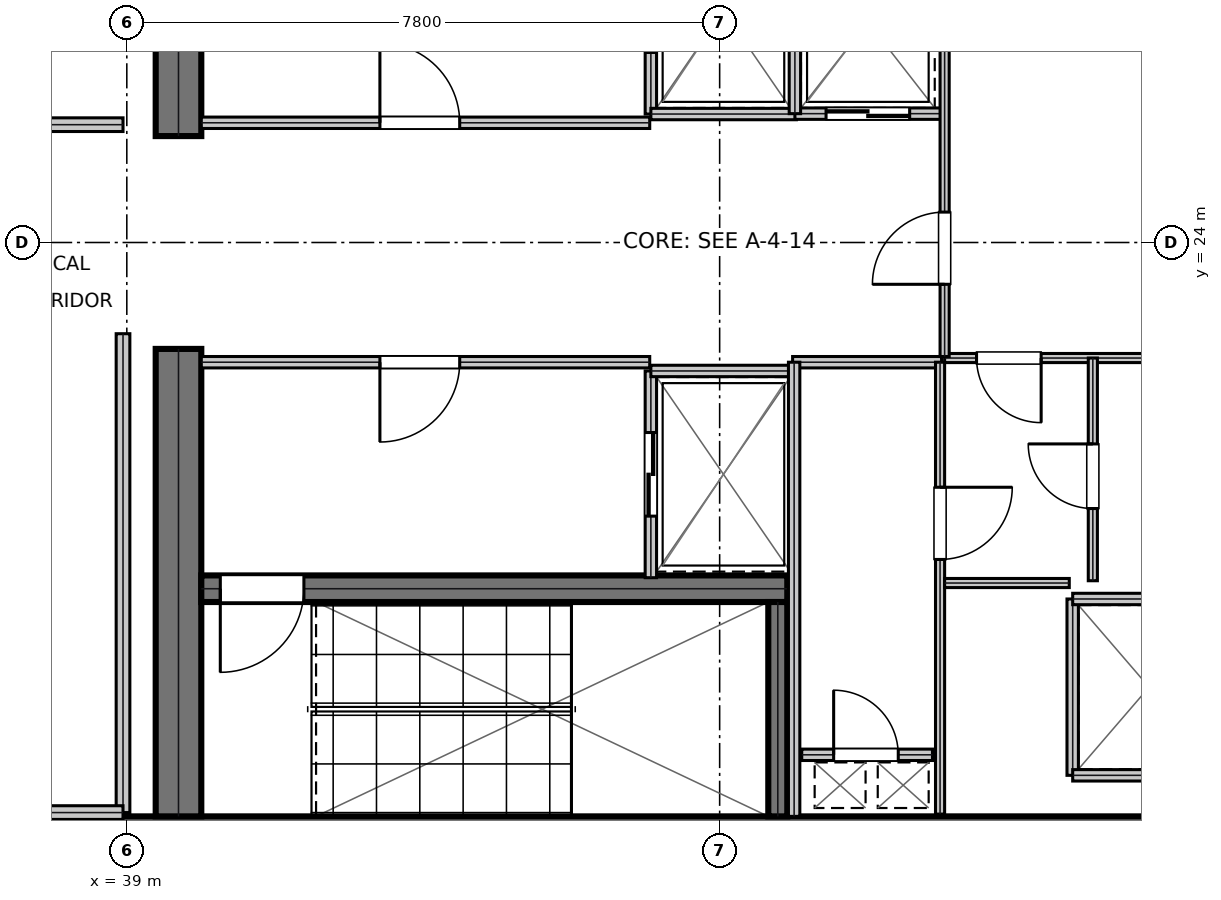
"""IFC4 building model, lengths in metres.
Left out: names, types, materials, properties, quantities, classifications, styles, units other than length and angle.
Written with IfcOpenShell. Run it as: python <this file> out.ifc"""

import sys

from ifc_helpers import new_model, si_unit, direction, frame, frame_2d, origin, place, context, subcontext, project, spatial, rectangle, extrude, element, fill, save


model = new_model("IFC4")
c1 = context("Model", 3, precision=1e-05, world=origin(), true_north=direction((0.0, 1.0)))
c2 = subcontext(c1, "Body", "Model", "MODEL_VIEW")
j1 = project(units=[si_unit("LENGTHUNIT", "METRE"), si_unit("PLANEANGLEUNIT", "RADIAN")], contexts=[c1])
p1 = place(None, origin())
s1 = spatial("IfcSite", under=j1, at=p1, CompositionType="ELEMENT")
p2 = place(p1, origin())
s2 = spatial("IfcBuilding", under=s1, at=p2, CompositionType="ELEMENT")
p3 = place(p2, frame((0.0, 0.0, 332.4)))
s3 = spatial("IfcBuildingStorey", under=s2, at=p3, CompositionType="ELEMENT", Elevation=332.4)
p4 = place(p3, frame((38.8, 16.15, 0.0), z_axis=(0.0, 0.0, 1.0), x_axis=(1.0, 0.0, 0.0)))
e1 = element("IfcWall", 1, at=p4, inside=s3, PredefinedType="SHEAR", context=c2, shape_type="SweptSolid", body=[
    extrude(rectangle(XDim=16.0, YDim=0.6, at=frame_2d((8.0, 0.0))), origin(), (0.0, 0.0, 1.0), 4.18),
])
for number, where, z_axis, x_axis in (
    (2, (39.68, 16.45, 0.0), (0.0, 0.0, 1.0), (0.0, 1.0, 0.0)),
    (3, (39.68, 25.4, 0.0), (0.0, 0.0, 1.0), (0.0, 1.0, 0.0)),
):
    element("IfcWall", number, at=place(p3, frame(where, z_axis=z_axis, x_axis=x_axis)), inside=s3, PredefinedType="SHEAR", context=c2, shape_type="SweptSolid", body=[
        extrude(rectangle(XDim=6.15, YDim=0.6, at=frame_2d((3.075, 0.0))), origin(), (0.0, 0.0, 1.0), 4.18),
    ])
p5 = place(p3, frame((39.98, 19.445, 0.0), z_axis=(0.0, 0.0, 1.0), x_axis=(1.0, 0.0, 0.0)))
e4 = element("IfcWall", 4, at=p5, inside=s3, PredefinedType="SHEAR", context=c2, shape_type="SweptSolid", body=[
    extrude(rectangle(XDim=7.71, YDim=0.35, at=frame_2d((3.855, 0.0))), origin(), (0.0, 0.0, 1.0), 4.18),
])
p6 = place(p5, frame((0.25, 0.0, 0.0)))
e5 = element("IfcOpeningElement", 5, at=p6, cuts=e4, PredefinedType="OPENING", context=c2, shape_type="SweptSolid", body=[
    extrude(rectangle(XDim=1.1, YDim=2.15, at=frame_2d((0.55, 1.075))), frame((0.0, 0.185, 0.0), z_axis=(0.0, -1.0, 0.0), x_axis=(1.0, 0.0, 0.0)), (0.0, 0.0, 1.0), 0.37),
])
p7 = place(p3, frame((47.565, 16.45, 0.0), z_axis=(0.0, 0.0, 1.0), x_axis=(0.0, 1.0, 0.0)))
e6 = element("IfcWall", 6, at=p7, inside=s3, PredefinedType="SHEAR", context=c2, shape_type="SweptSolid", body=[
    extrude(rectangle(XDim=2.82, YDim=0.25, at=frame_2d((1.41, 0.0))), origin(), (0.0, 0.0, 1.0), 4.18),
])
p8 = place(p3, frame((39.98, 25.575, 0.0), z_axis=(0.0, 0.0, 1.0), x_axis=(1.0, 0.0, 0.0)))
e7 = element("IfcWall", 7, at=p8, inside=s3, PredefinedType="PARTITIONING", context=c2, shape_type="SweptSolid", body=[
    extrude(rectangle(XDim=5.9, YDim=0.15, at=frame_2d((2.95, 0.0))), origin(), (0.0, 0.0, 1.0), 4.18),
])
p9 = place(p8, frame((2.35, 0.0, 0.0)))
e8 = element("IfcOpeningElement", 8, at=p9, cuts=e7, PredefinedType="OPENING", context=c2, shape_type="SweptSolid", body=[
    extrude(rectangle(XDim=1.05, YDim=2.15, at=frame_2d((0.525, 1.075))), frame((0.0, 0.085, 0.0), z_axis=(0.0, -1.0, 0.0), x_axis=(1.0, 0.0, 0.0)), (0.0, 0.0, 1.0), 0.17),
])
p10 = place(p3, frame((39.98, 22.425, 0.0), z_axis=(0.0, 0.0, 1.0), x_axis=(1.0, 0.0, 0.0)))
e9 = element("IfcWall", 9, at=p10, inside=s3, PredefinedType="PARTITIONING", context=c2, shape_type="SweptSolid", body=[
    extrude(rectangle(XDim=5.9, YDim=0.15, at=frame_2d((2.95, 0.0))), origin(), (0.0, 0.0, 1.0), 4.18),
])
p11 = place(p10, frame((2.35, 0.0, 0.0)))
e10 = element("IfcOpeningElement", 10, at=p11, cuts=e9, PredefinedType="OPENING", context=c2, shape_type="SweptSolid", body=[
    extrude(rectangle(XDim=1.05, YDim=2.15, at=frame_2d((0.525, 1.075))), frame((0.0, 0.085, 0.0), z_axis=(0.0, -1.0, 0.0), x_axis=(1.0, 0.0, 0.0)), (0.0, 0.0, 1.0), 0.17),
])
p12 = place(p3, frame((45.895, 25.69, 0.0), z_axis=(0.0, 0.0, 1.0), x_axis=(0.0, 1.0, 0.0)))
e11 = element("IfcWall", 11, at=p12, inside=s3, PredefinedType="PARTITIONING", context=c2, shape_type="SweptSolid", body=[
    extrude(rectangle(XDim=2.72, YDim=0.15, at=frame_2d((1.36, 0.0))), origin(), (0.0, 0.0, 1.0), 4.18),
])
p13 = place(p12, frame((0.81, 0.0, 0.0)))
e12 = element("IfcOpeningElement", 12, at=p13, cuts=e11, PredefinedType="OPENING", context=c2, shape_type="SweptSolid", body=[
    extrude(rectangle(XDim=1.1, YDim=2.15, at=frame_2d((0.55, 1.075))), frame((0.0, 0.085, 0.0), z_axis=(0.0, -1.0, 0.0), x_axis=(1.0, 0.0, 0.0)), (0.0, 0.0, 1.0), 0.17),
])
p14 = place(p3, frame((45.895, 25.69, 0.0), z_axis=(0.0, 0.0, 1.0), x_axis=(1.0, 0.0, 0.0)))
e13 = element("IfcWall", 13, at=p14, inside=s3, PredefinedType="PARTITIONING", context=c2, shape_type="SweptSolid", body=[
    extrude(rectangle(XDim=1.915, YDim=0.15, at=frame_2d((0.958, 0.0))), origin(), (0.0, 0.0, 1.0), 4.18),
])
p15 = place(p3, frame((45.895, 19.59, 0.0), z_axis=(0.0, 0.0, 1.0), x_axis=(0.0, 1.0, 0.0)))
e14 = element("IfcWall", 14, at=p15, inside=s3, PredefinedType="PARTITIONING", context=c2, shape_type="SweptSolid", body=[
    extrude(rectangle(XDim=2.72, YDim=0.15, at=frame_2d((1.36, 0.0))), origin(), (0.0, 0.0, 1.0), 4.18),
])
p16 = place(p15, frame((0.81, 0.0, 0.0)))
e15 = element("IfcOpeningElement", 15, at=p16, cuts=e14, PredefinedType="OPENING", context=c2, shape_type="SweptSolid", body=[
    extrude(rectangle(XDim=1.1, YDim=2.15, at=frame_2d((0.55, 1.075))), frame((0.0, 0.085, 0.0), z_axis=(0.0, -1.0, 0.0), x_axis=(1.0, 0.0, 0.0)), (0.0, 0.0, 1.0), 0.17),
])
p17 = place(p3, frame((45.895, 22.31, 0.0), z_axis=(0.0, 0.0, 1.0), x_axis=(1.0, 0.0, 0.0)))
e16 = element("IfcWall", 16, at=p17, inside=s3, PredefinedType="PARTITIONING", context=c2, shape_type="SweptSolid", body=[
    extrude(rectangle(XDim=1.915, YDim=0.15, at=frame_2d((0.958, 0.0))), origin(), (0.0, 0.0, 1.0), 4.18),
])
p18 = place(p3, frame((47.79, 25.695, 0.0), z_axis=(0.0, 0.0, 1.0), x_axis=(1.0, 0.0, 0.0)))
e17 = element("IfcWall", 17, at=p18, inside=s3, PredefinedType="PARTITIONING", context=c2, shape_type="SweptSolid", body=[
    extrude(rectangle(XDim=1.92, YDim=0.15, at=frame_2d((0.96, 0.0))), origin(), (0.0, 0.0, 1.0), 4.18),
])
p19 = place(p18, frame((0.41, 0.0, 0.0)))
e18 = element("IfcOpeningElement", 18, at=p19, cuts=e17, PredefinedType="OPENING", context=c2, shape_type="SweptSolid", body=[
    extrude(rectangle(XDim=1.1, YDim=2.15, at=frame_2d((0.55, 1.075))), frame((0.0, 0.085, 0.0), z_axis=(0.0, -1.0, 0.0), x_axis=(1.0, 0.0, 0.0)), (0.0, 0.0, 1.0), 0.17),
])
p20 = place(p3, frame((47.79, 25.695, 0.0), z_axis=(0.0, 0.0, 1.0), x_axis=(0.0, 1.0, 0.0)))
e19 = element("IfcWall", 19, at=p20, inside=s3, PredefinedType="PARTITIONING", context=c2, shape_type="SweptSolid", body=[
    extrude(rectangle(XDim=2.415, YDim=0.15, at=frame_2d((1.208, 0.0))), origin(), (0.0, 0.0, 1.0), 4.18),
])
p21 = place(p3, frame((51.445, 16.99, 0.0), z_axis=(0.0, 0.0, 1.0), x_axis=(0.0, 1.0, 0.0)))
e20 = element("IfcWall", 20, at=p21, inside=s3, PredefinedType="PARTITIONING", context=c2, shape_type="SweptSolid", body=[
    extrude(rectangle(XDim=2.32, YDim=0.15, at=frame_2d((1.16, 0.0))), origin(), (0.0, 0.0, 1.0), 4.18),
])
for number, where, z_axis, x_axis in (
    (21, (51.445, 16.99, 0.0), (0.0, 0.0, 1.0), (1.0, 0.0, 0.0)),
    (22, (51.445, 19.31, 0.0), (0.0, 0.0, 1.0), (1.0, 0.0, 0.0)),
):
    element("IfcWall", number, at=place(p3, frame(where, z_axis=z_axis, x_axis=x_axis)), inside=s3, PredefinedType="PARTITIONING", context=c2, shape_type="SweptSolid", body=[
        extrude(rectangle(XDim=2.015, YDim=0.15, at=frame_2d((1.007, 0.0))), origin(), (0.0, 0.0, 1.0), 4.18),
    ])
p22 = place(p3, frame((47.88, 17.26, 0.0), z_axis=(0.0, 0.0, 1.0), x_axis=(1.0, 0.0, 0.0)))
e23 = element("IfcWall", 23, at=p22, inside=s3, PredefinedType="PARTITIONING", context=c2, shape_type="SweptSolid", body=[
    extrude(rectangle(XDim=1.72, YDim=0.15, at=frame_2d((0.86, 0.0))), origin(), (0.0, 0.0, 1.0), 4.18),
])
p23 = place(p22, frame((0.42, 0.0, 0.0)))
e24 = element("IfcOpeningElement", 24, at=p23, cuts=e23, PredefinedType="OPENING", context=c2, shape_type="SweptSolid", body=[
    extrude(rectangle(XDim=0.85, YDim=2.15, at=frame_2d((0.425, 1.075))), frame((0.0, 0.085, 0.0), z_axis=(0.0, -1.0, 0.0), x_axis=(1.0, 0.0, 0.0)), (0.0, 0.0, 1.0), 0.17),
])
p24 = place(p3, frame((47.76, 22.425, 0.0), z_axis=(0.0, 0.0, 1.0), x_axis=(1.0, 0.0, 0.0)))
e25 = element("IfcWall", 25, at=p24, inside=s3, PredefinedType="PARTITIONING", context=c2, shape_type="SweptSolid", body=[
    extrude(rectangle(XDim=1.96, YDim=0.15, at=frame_2d((0.98, 0.0))), origin(), (0.0, 0.0, 1.0), 4.18),
])
p25 = place(p3, frame((47.78, 16.45, 0.0), z_axis=(0.0, 0.0, 1.0), x_axis=(0.0, 1.0, 0.0)))
e26 = element("IfcWall", 26, at=p25, inside=s3, PredefinedType="PARTITIONING", context=c2, shape_type="SweptSolid", body=[
    extrude(rectangle(XDim=5.975, YDim=0.15, at=frame_2d((2.988, 0.0))), origin(), (0.0, 0.0, 1.0), 4.18),
])
p26 = place(p3, frame((49.7, 16.48, 0.0), z_axis=(0.0, 0.0, 1.0), x_axis=(0.0, 1.0, 0.0)))
e27 = element("IfcWall", 27, at=p26, inside=s3, PredefinedType="PARTITIONING", context=c2, shape_type="SweptSolid", body=[
    extrude(rectangle(XDim=5.945, YDim=0.12, at=frame_2d((2.973, 0.0))), origin(), (0.0, 0.0, 1.0), 4.18),
])
p27 = place(p26, frame((3.35, 0.0, 0.0)))
e28 = element("IfcOpeningElement", 28, at=p27, cuts=e27, PredefinedType="OPENING", context=c2, shape_type="SweptSolid", body=[
    extrude(rectangle(XDim=0.95, YDim=2.15, at=frame_2d((0.475, 1.075))), frame((0.0, 0.07, 0.0), z_axis=(0.0, -1.0, 0.0), x_axis=(1.0, 0.0, 0.0)), (0.0, 0.0, 1.0), 0.14),
])
p28 = place(p3, frame((49.76, 22.48, 0.0), z_axis=(0.0, 0.0, 1.0), x_axis=(1.0, 0.0, 0.0)))
e29 = element("IfcWall", 29, at=p28, inside=s3, PredefinedType="PARTITIONING", context=c2, shape_type="SweptSolid", body=[
    extrude(rectangle(XDim=3.9, YDim=0.12, at=frame_2d((1.95, 0.0))), origin(), (0.0, 0.0, 1.0), 4.18),
])
p29 = place(p28, frame((0.42, 0.0, 0.0)))
e30 = element("IfcOpeningElement", 30, at=p29, cuts=e29, PredefinedType="OPENING", context=c2, shape_type="SweptSolid", body=[
    extrude(rectangle(XDim=0.85, YDim=2.15, at=frame_2d((0.425, 1.075))), frame((0.0, 0.07, 0.0), z_axis=(0.0, -1.0, 0.0), x_axis=(1.0, 0.0, 0.0)), (0.0, 0.0, 1.0), 0.14),
])
p30 = place(p3, frame((51.71, 19.55, 0.0), z_axis=(0.0, 0.0, 1.0), x_axis=(0.0, 1.0, 0.0)))
e31 = element("IfcWall", 31, at=p30, inside=s3, PredefinedType="PARTITIONING", context=c2, shape_type="SweptSolid", body=[
    extrude(rectangle(XDim=2.93, YDim=0.12, at=frame_2d((1.465, 0.0))), origin(), (0.0, 0.0, 1.0), 4.18),
])
p31 = place(p30, frame((0.95, 0.0, 0.0)))
e32 = element("IfcOpeningElement", 32, at=p31, cuts=e31, PredefinedType="OPENING", context=c2, shape_type="SweptSolid", body=[
    extrude(rectangle(XDim=0.85, YDim=2.15, at=frame_2d((0.425, 1.075))), frame((0.0, 0.07, 0.0), z_axis=(0.0, -1.0, 0.0), x_axis=(1.0, 0.0, 0.0)), (0.0, 0.0, 1.0), 0.14),
])
p32 = place(p3, frame((49.76, 19.52, 0.0), z_axis=(0.0, 0.0, 1.0), x_axis=(1.0, 0.0, 0.0)))
e33 = element("IfcWall", 33, at=p32, inside=s3, PredefinedType="PARTITIONING", context=c2, shape_type="SweptSolid", body=[
    extrude(rectangle(XDim=1.64, YDim=0.12, at=frame_2d((0.82, 0.0))), origin(), (0.0, 0.0, 1.0), 4.18),
])
p33 = place(p3, frame((49.76, 22.5, 0.0), z_axis=(0.0, 0.0, 1.0), x_axis=(0.0, 1.0, 0.0)))
e34 = element("IfcWall", 34, at=p33, inside=s3, PredefinedType="PARTITIONING", context=c2, shape_type="SweptSolid", body=[
    extrude(rectangle(XDim=5.72, YDim=0.12, at=frame_2d((2.86, 0.0))), origin(), (0.0, 0.0, 1.0), 4.18),
])
p34 = place(p33, frame((0.95, 0.0, 0.0)))
e35 = element("IfcOpeningElement", 35, at=p34, cuts=e34, PredefinedType="OPENING", context=c2, shape_type="SweptSolid", body=[
    extrude(rectangle(XDim=0.95, YDim=2.15, at=frame_2d((0.475, 1.075))), frame((0.0, 0.07, 0.0), z_axis=(0.0, -1.0, 0.0), x_axis=(1.0, 0.0, 0.0)), (0.0, 0.0, 1.0), 0.14),
])
p35 = place(p3, frame((38.95, 16.5, 0.0), z_axis=(0.0, 0.0, 1.0), x_axis=(0.0, 1.0, 0.0)))
e36 = element("IfcWall", 36, at=p35, inside=s3, PredefinedType="SOLIDWALL", context=c2, shape_type="SweptSolid", body=[
    extrude(rectangle(XDim=6.3, YDim=0.18, at=frame_2d((3.15, 0.0))), origin(), (0.0, 0.0, 1.0), 3.91),
])
for number, where, z_axis, x_axis in (
    (37, (37.05, 16.5, 0.0), (0.0, 0.0, 1.0), (1.0, 0.0, 0.0)),
    (38, (37.05, 25.55, 0.0), (0.0, 0.0, 1.0), (1.0, 0.0, 0.0)),
):
    element("IfcWall", number, at=place(p3, frame(where, z_axis=z_axis, x_axis=x_axis)), inside=s3, PredefinedType="SOLIDWALL", context=c2, shape_type="SweptSolid", body=[
        extrude(rectangle(XDim=1.9, YDim=0.18, at=frame_2d((0.95, 0.0))), origin(), (0.0, 0.0, 1.0), 4.18),
    ])
p36 = place(p9, origin())
e39 = element("IfcDoor", 39, at=p36, inside=s3, OperationType="SINGLE_SWING_LEFT", PredefinedType="DOOR", context=c2, shape_type="SweptSolid", body=[
    extrude(rectangle(XDim=1.05, YDim=2.15, at=frame_2d((0.525, 1.075))), frame((0.0, 0.025, 0.0), z_axis=(0.0, -1.0, 0.0), x_axis=(1.0, 0.0, 0.0)), (0.0, 0.0, 1.0), 0.05),
])
fill(e8, e39)
p37 = place(p11, frame((1.05, 0.0, 0.0), z_axis=(0.0, 0.0, 1.0), x_axis=(-1.0, 0.0, 0.0)))
e40 = element("IfcDoor", 40, at=p37, inside=s3, OperationType="SINGLE_SWING_RIGHT", PredefinedType="DOOR", context=c2, shape_type="SweptSolid", body=[
    extrude(rectangle(XDim=1.05, YDim=2.15, at=frame_2d((0.525, 1.075))), frame((0.0, 0.025, 0.0), z_axis=(0.0, -1.0, 0.0), x_axis=(1.0, 0.0, 0.0)), (0.0, 0.0, 1.0), 0.05),
])
fill(e10, e40)
p38 = place(p16, frame((1.1, 0.0, 0.0), z_axis=(0.0, 0.0, 1.0), x_axis=(-1.0, 0.0, 0.0)))
e41 = element("IfcDoor", 41, at=p38, inside=s3, OperationType="DOUBLE_DOOR_SLIDING", PredefinedType="DOOR", context=c2, shape_type="SweptSolid", body=[
    extrude(rectangle(XDim=1.1, YDim=2.15, at=frame_2d((0.55, 1.075))), frame((0.0, 0.025, 0.0), z_axis=(0.0, -1.0, 0.0), x_axis=(1.0, 0.0, 0.0)), (0.0, 0.0, 1.0), 0.05),
])
fill(e15, e41)
p39 = place(p19, frame((1.1, 0.0, 0.0), z_axis=(0.0, 0.0, 1.0), x_axis=(-1.0, 0.0, 0.0)))
e42 = element("IfcDoor", 42, at=p39, inside=s3, OperationType="DOUBLE_DOOR_SLIDING", PredefinedType="DOOR", context=c2, shape_type="SweptSolid", body=[
    extrude(rectangle(XDim=1.1, YDim=2.15, at=frame_2d((0.55, 1.075))), frame((0.0, 0.025, 0.0), z_axis=(0.0, -1.0, 0.0), x_axis=(1.0, 0.0, 0.0)), (0.0, 0.0, 1.0), 0.05),
])
fill(e18, e42)
p40 = place(p23, origin())
e43 = element("IfcDoor", 43, at=p40, inside=s3, OperationType="SINGLE_SWING_LEFT", PredefinedType="TRAPDOOR", context=c2, shape_type="SweptSolid", body=[
    extrude(rectangle(XDim=0.85, YDim=2.15, at=frame_2d((0.425, 1.075))), frame((0.0, 0.025, 0.0), z_axis=(0.0, -1.0, 0.0), x_axis=(1.0, 0.0, 0.0)), (0.0, 0.0, 1.0), 0.05),
])
fill(e24, e43)
p41 = place(p27, frame((0.95, 0.0, 0.0), z_axis=(0.0, 0.0, 1.0), x_axis=(-1.0, 0.0, 0.0)))
e44 = element("IfcDoor", 44, at=p41, inside=s3, OperationType="SINGLE_SWING_LEFT", PredefinedType="DOOR", context=c2, shape_type="SweptSolid", body=[
    extrude(rectangle(XDim=0.95, YDim=2.15, at=frame_2d((0.475, 1.075))), frame((0.0, 0.025, 0.0), z_axis=(0.0, -1.0, 0.0), x_axis=(1.0, 0.0, 0.0)), (0.0, 0.0, 1.0), 0.05),
])
fill(e28, e44)
p42 = place(p29, frame((0.85, 0.0, 0.0), z_axis=(0.0, 0.0, 1.0), x_axis=(-1.0, 0.0, 0.0)))
e45 = element("IfcDoor", 45, at=p42, inside=s3, OperationType="SINGLE_SWING_LEFT", PredefinedType="DOOR", context=c2, shape_type="SweptSolid", body=[
    extrude(rectangle(XDim=0.85, YDim=2.15, at=frame_2d((0.425, 1.075))), frame((0.0, 0.025, 0.0), z_axis=(0.0, -1.0, 0.0), x_axis=(1.0, 0.0, 0.0)), (0.0, 0.0, 1.0), 0.05),
])
fill(e30, e45)
p43 = place(p31, origin())
e46 = element("IfcDoor", 46, at=p43, inside=s3, OperationType="SINGLE_SWING_RIGHT", PredefinedType="DOOR", context=c2, shape_type="SweptSolid", body=[
    extrude(rectangle(XDim=0.85, YDim=2.15, at=frame_2d((0.425, 1.075))), frame((0.0, 0.025, 0.0), z_axis=(0.0, -1.0, 0.0), x_axis=(1.0, 0.0, 0.0)), (0.0, 0.0, 1.0), 0.05),
])
fill(e32, e46)
p44 = place(p34, origin())
e47 = element("IfcDoor", 47, at=p44, inside=s3, OperationType="SINGLE_SWING_LEFT", PredefinedType="DOOR", context=c2, shape_type="SweptSolid", body=[
    extrude(rectangle(XDim=0.95, YDim=2.15, at=frame_2d((0.475, 1.075))), frame((0.0, 0.025, 0.0), z_axis=(0.0, -1.0, 0.0), x_axis=(1.0, 0.0, 0.0)), (0.0, 0.0, 1.0), 0.05),
])
fill(e35, e47)
p45 = place(p6, frame((1.1, 0.0, 0.0), z_axis=(0.0, 0.0, 1.0), x_axis=(-1.0, 0.0, 0.0)))
e48 = element("IfcDoor", 48, at=p45, inside=s3, OperationType="SINGLE_SWING_RIGHT", PredefinedType="DOOR", context=c2, shape_type="SweptSolid", body=[
    extrude(rectangle(XDim=1.1, YDim=2.15, at=frame_2d((0.55, 1.075))), frame((0.0, 0.025, 0.0), z_axis=(0.0, -1.0, 0.0), x_axis=(1.0, 0.0, 0.0)), (0.0, 0.0, 1.0), 0.05),
])
fill(e5, e48)
save(model, sys.argv[1])
